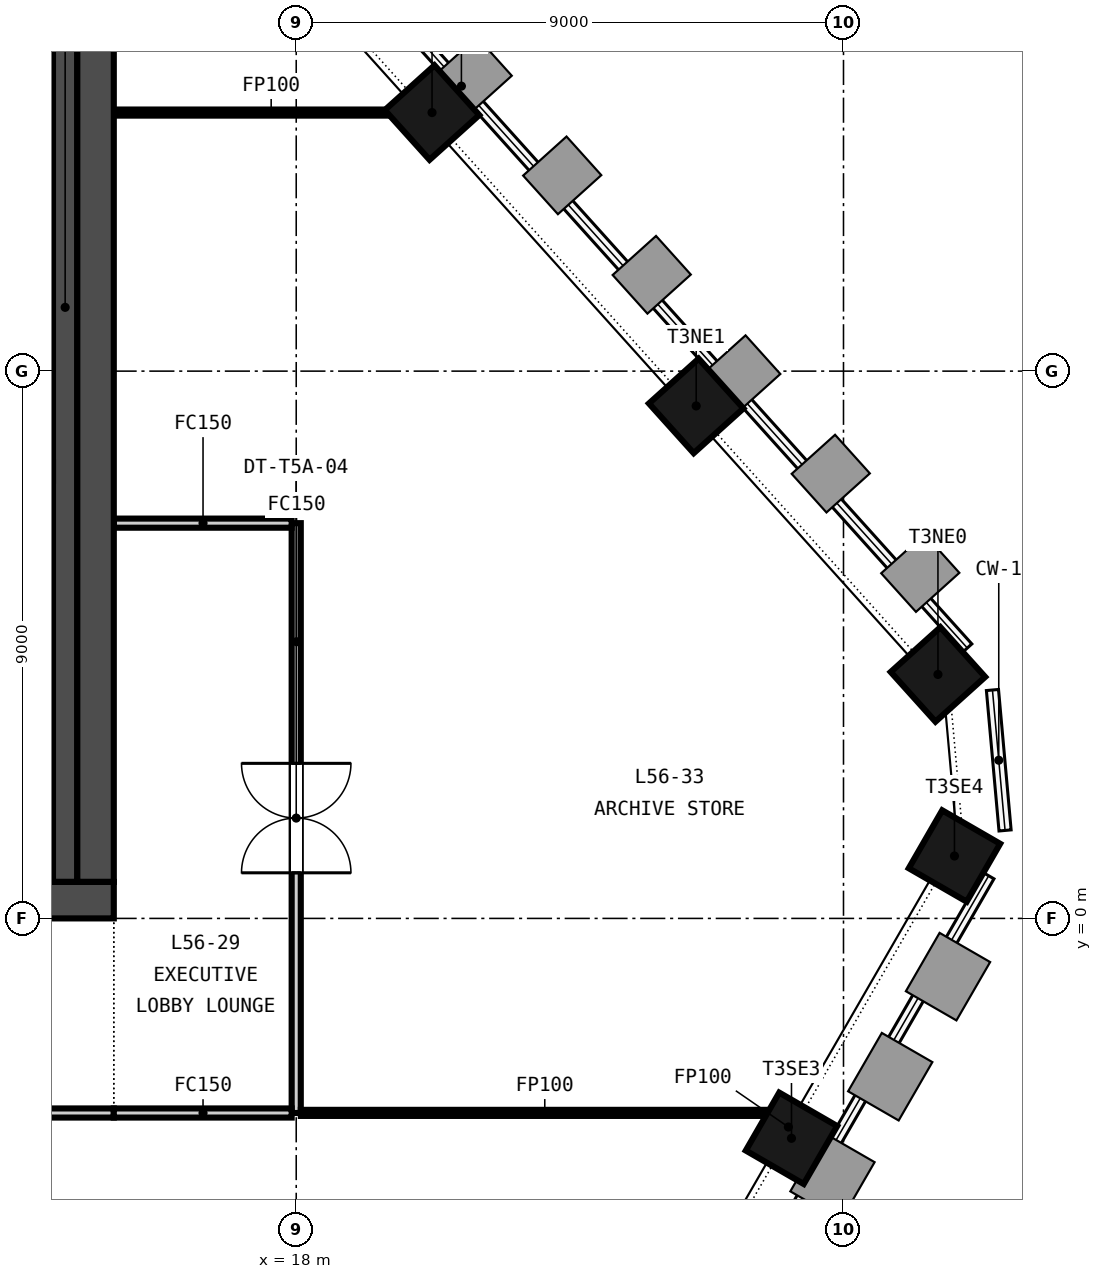
"""IFC4 building model, lengths in metres.
Left out: names, types, materials, properties, quantities, classifications, styles, units other than length and angle.
Written with IfcOpenShell. Run it as: python <this file> out.ifc"""

import sys

from ifc_helpers import new_model, si_unit, direction, frame, frame_2d, origin, origin_2d, place, context, subcontext, project, spatial, rectangle, extrude, element, fill, save


model = new_model("IFC4")
c1 = context("Model", 3, precision=1e-05, world=origin(), true_north=direction((0.0, 1.0)))
c2 = subcontext(c1, "Body", "Model", "MODEL_VIEW")
j1 = project(units=[si_unit("LENGTHUNIT", "METRE"), si_unit("PLANEANGLEUNIT", "RADIAN")], contexts=[c1])
p1 = place(None, origin())
s1 = spatial("IfcSite", under=j1, at=p1, CompositionType="ELEMENT")
p2 = place(p1, origin())
s2 = spatial("IfcBuilding", under=s1, at=p2, CompositionType="ELEMENT")
p3 = place(p2, frame((0.0, 0.0, 223.6)))
s3 = spatial("IfcBuildingStorey", under=s2, at=p3, CompositionType="ELEMENT", Elevation=223.6)
p4 = place(p3, frame((-15.0, 0.3, -0.15), z_axis=(0.0, 0.0, 1.0), x_axis=(1.0, 0.0, 0.0)))
e1 = element("IfcWall", 1, at=p4, inside=s3, PredefinedType="SOLIDWALL", context=c2, shape_type="SweptSolid", body=[
    extrude(rectangle(XDim=30.0, YDim=0.6, at=frame_2d((15.0, 0.0))), origin(), (0.0, 0.0, 1.0), 3.65),
])
p5 = place(p4, frame((5.8, 0.0, 0.15)))
e2 = element("IfcOpeningElement", 2, at=p5, cuts=e1, PredefinedType="OPENING", context=c2, shape_type="SweptSolid", body=[
    extrude(rectangle(XDim=2.4, YDim=2.4, at=frame_2d((1.2, 1.2))), frame((0.0, 0.31, 0.0), z_axis=(0.0, -1.0, 0.0), x_axis=(1.0, 0.0, 0.0)), (0.0, 0.0, 1.0), 0.62),
])
p6 = place(p4, frame((13.8, 0.0, 0.15)))
e3 = element("IfcOpeningElement", 3, at=p6, cuts=e1, PredefinedType="OPENING", context=c2, shape_type="SweptSolid", body=[
    extrude(rectangle(XDim=2.4, YDim=2.4, at=frame_2d((1.2, 1.2))), frame((0.0, 0.31, 0.0), z_axis=(0.0, -1.0, 0.0), x_axis=(1.0, 0.0, 0.0)), (0.0, 0.0, 1.0), 0.62),
])
p7 = place(p4, frame((21.8, 0.0, 0.15)))
e4 = element("IfcOpeningElement", 4, at=p7, cuts=e1, PredefinedType="OPENING", context=c2, shape_type="SweptSolid", body=[
    extrude(rectangle(XDim=2.4, YDim=2.4, at=frame_2d((1.2, 1.2))), frame((0.0, 0.31, 0.0), z_axis=(0.0, -1.0, 0.0), x_axis=(1.0, 0.0, 0.0)), (0.0, 0.0, 1.0), 0.62),
])
p8 = place(p4, frame((1.5, 0.0, 0.15)))
e5 = element("IfcOpeningElement", 5, at=p8, cuts=e1, PredefinedType="OPENING", context=c2, shape_type="SweptSolid", body=[
    extrude(rectangle(XDim=1.2, YDim=2.1, at=frame_2d((0.6, 1.05))), frame((0.0, 0.31, 0.0), z_axis=(0.0, -1.0, 0.0), x_axis=(1.0, 0.0, 0.0)), (0.0, 0.0, 1.0), 0.62),
])
p9 = place(p4, frame((27.3, 0.0, 0.15)))
e6 = element("IfcOpeningElement", 6, at=p9, cuts=e1, PredefinedType="OPENING", context=c2, shape_type="SweptSolid", body=[
    extrude(rectangle(XDim=1.2, YDim=2.1, at=frame_2d((0.6, 1.05))), frame((0.0, 0.31, 0.0), z_axis=(0.0, -1.0, 0.0), x_axis=(1.0, 0.0, 0.0)), (0.0, 0.0, 1.0), 0.62),
])
p10 = place(p3, frame((14.7, 0.6, -0.15), z_axis=(0.0, 0.0, 1.0), x_axis=(0.0, 1.0, 0.0)))
e7 = element("IfcWall", 7, at=p10, inside=s3, PredefinedType="SOLIDWALL", context=c2, shape_type="SweptSolid", body=[
    extrude(rectangle(XDim=13.8, YDim=0.6, at=frame_2d((6.9, 0.0))), origin(), (0.0, 0.0, 1.0), 3.65),
])
for number, where, z_axis, x_axis in (
    (8, (26.145, -3.616, -0.15), (0.0, 0.0, 1.0), (0.5, 0.866, 0.0)),
    (9, (28.825, 1.026, -0.15), (0.0, 0.0, 1.0), (0.5, 0.866, 0.0)),
    (10, (28.553, 4.012, -0.15), (0.0, 0.0, 1.0), (-0.669, 0.743, 0.0)),
    (11, (24.577, 8.427, -0.15), (0.0, 0.0, 1.0), (-0.669, 0.743, 0.0)),
    (12, (20.233, 13.252, -0.15), (0.0, 0.0, 1.0), (-0.669, 0.743, 0.0)),
):
    element("IfcColumn", number, at=place(p3, frame(where, z_axis=z_axis, x_axis=x_axis)), inside=s3, PredefinedType="COLUMN", context=c2, shape_type="SweptSolid", body=[
        extrude(rectangle(XDim=1.1, YDim=1.1, at=origin_2d()), origin(), (0.0, 0.0, 1.0), 3.65),
    ])
p11 = place(p3, frame((11.05, 7.35, 0.0), z_axis=(0.0, 0.0, 1.0), x_axis=(1.0, 0.0, 0.0)))
e13 = element("IfcWall", 13, at=p11, inside=s3, PredefinedType="SOLIDWALL", context=c2, shape_type="SweptSolid", body=[
    extrude(rectangle(XDim=2.95, YDim=0.3, at=frame_2d((1.475, 0.0))), origin(), (0.0, 0.0, 1.0), 3.5),
])
p12 = place(p3, frame((14.2, 0.6, 0.0), z_axis=(0.0, 0.0, 1.0), x_axis=(0.0, 1.0, 0.0)))
e14 = element("IfcWall", 14, at=p12, inside=s3, PredefinedType="SOLIDWALL", context=c2, shape_type="SweptSolid", body=[
    extrude(rectangle(XDim=13.8, YDim=0.4, at=frame_2d((6.9, 0.0))), origin(), (0.0, 0.0, 1.0), 3.5),
])
p13 = place(p3, frame((15.0, -3.2, 0.0), z_axis=(0.0, 0.0, 1.0), x_axis=(-1.0, 0.0, 0.0)))
e15 = element("IfcWall", 15, at=p13, inside=s3, PredefinedType="PARTITIONING", context=c2, shape_type="SweptSolid", body=[
    extrude(rectangle(XDim=30.0, YDim=0.15, at=frame_2d((15.0, 0.0))), origin(), (0.0, 0.0, 1.0), 2.75),
])
p14 = place(p13, frame((14.1, 0.0, 0.0)))
e16 = element("IfcOpeningElement", 16, at=p14, cuts=e15, PredefinedType="OPENING", context=c2, shape_type="SweptSolid", body=[
    extrude(rectangle(XDim=1.8, YDim=2.1, at=frame_2d((0.9, 1.05))), frame((0.0, 0.085, 0.0), z_axis=(0.0, -1.0, 0.0), x_axis=(1.0, 0.0, 0.0)), (0.0, 0.0, 1.0), 0.17),
])
p15 = place(p3, frame((18.0, 6.5, 0.0), z_axis=(0.0, 0.0, 1.0), x_axis=(0.0, -1.0, 0.0)))
e17 = element("IfcWall", 17, at=p15, inside=s3, PredefinedType="PARTITIONING", context=c2, shape_type="SweptSolid", body=[
    extrude(rectangle(XDim=9.7, YDim=0.15, at=frame_2d((4.85, 0.0))), origin(), (0.0, 0.0, 1.0), 2.75),
])
p16 = place(p15, frame((3.95, 0.0, 0.0)))
e18 = element("IfcOpeningElement", 18, at=p16, cuts=e17, PredefinedType="OPENING", context=c2, shape_type="SweptSolid", body=[
    extrude(rectangle(XDim=1.8, YDim=2.1, at=frame_2d((0.9, 1.05))), frame((0.0, 0.085, 0.0), z_axis=(0.0, -1.0, 0.0), x_axis=(1.0, 0.0, 0.0)), (0.0, 0.0, 1.0), 0.17),
])
p17 = place(p3, frame((17.925, -3.2, 0.0), z_axis=(0.0, 0.0, 1.0), x_axis=(-1.0, 0.0, 0.0)))
e19 = element("IfcWall", 19, at=p17, inside=s3, PredefinedType="PARTITIONING", context=c2, shape_type="SweptSolid", body=[
    extrude(rectangle(XDim=2.925, YDim=0.15, at=frame_2d((1.462, 0.0))), origin(), (0.0, 0.0, 1.0), 2.75),
])
p18 = place(p3, frame((15.0, 13.252, 0.0), z_axis=(0.0, 0.0, 1.0), x_axis=(1.0, 0.0, 0.0)))
e20 = element("IfcWall", 20, at=p18, inside=s3, PredefinedType="PARTITIONING", context=c2, shape_type="SweptSolid", body=[
    extrude(rectangle(XDim=5.166, YDim=0.1, at=frame_2d((2.583, 0.0))), origin(), (0.0, 0.0, 1.0), 2.75),
])
p19 = place(p3, frame((15.0, 6.5, 0.0), z_axis=(0.0, 0.0, 1.0), x_axis=(1.0, 0.0, 0.0)))
e21 = element("IfcWall", 21, at=p19, inside=s3, PredefinedType="PARTITIONING", context=c2, shape_type="SweptSolid", body=[
    extrude(rectangle(XDim=2.925, YDim=0.15, at=frame_2d((1.462, 0.0))), origin(), (0.0, 0.0, 1.0), 2.75),
])
p20 = place(p3, frame((18.076, -3.198, 0.0), z_axis=(0.0, 0.0, 1.0), x_axis=(1.0, 0.0, 0.0)))
e22 = element("IfcWall", 22, at=p20, inside=s3, PredefinedType="PARTITIONING", context=c2, shape_type="SweptSolid", body=[
    extrude(rectangle(XDim=8.013, YDim=0.1, at=frame_2d((4.007, 0.0))), origin(), (0.0, 0.0, 1.0), 2.75),
])
p21 = place(p3, frame((26.089, -3.613, 0.0), z_axis=(0.0, 0.0, 1.0), x_axis=(0.0, 1.0, 0.0)))
e23 = element("IfcWall", 23, at=p21, inside=s3, PredefinedType="PARTITIONING", context=c2, shape_type="SweptSolid", body=[
    extrude(rectangle(XDim=0.365, YDim=0.1, at=frame_2d((0.183, 0.0))), origin(), (0.0, 0.0, 1.0), 2.75),
])
p22 = place(p16, origin())
e24 = element("IfcDoor", 24, at=p22, inside=s3, OperationType="DOUBLE_DOOR_DOUBLE_SWING", PredefinedType="DOOR", context=c2, shape_type="SweptSolid", body=[
    extrude(rectangle(XDim=1.8, YDim=2.1, at=frame_2d((0.9, 1.05))), frame((0.0, 0.025, 0.0), z_axis=(0.0, -1.0, 0.0), x_axis=(1.0, 0.0, 0.0)), (0.0, 0.0, 1.0), 0.05),
])
fill(e18, e24)
save(model, sys.argv[1])
